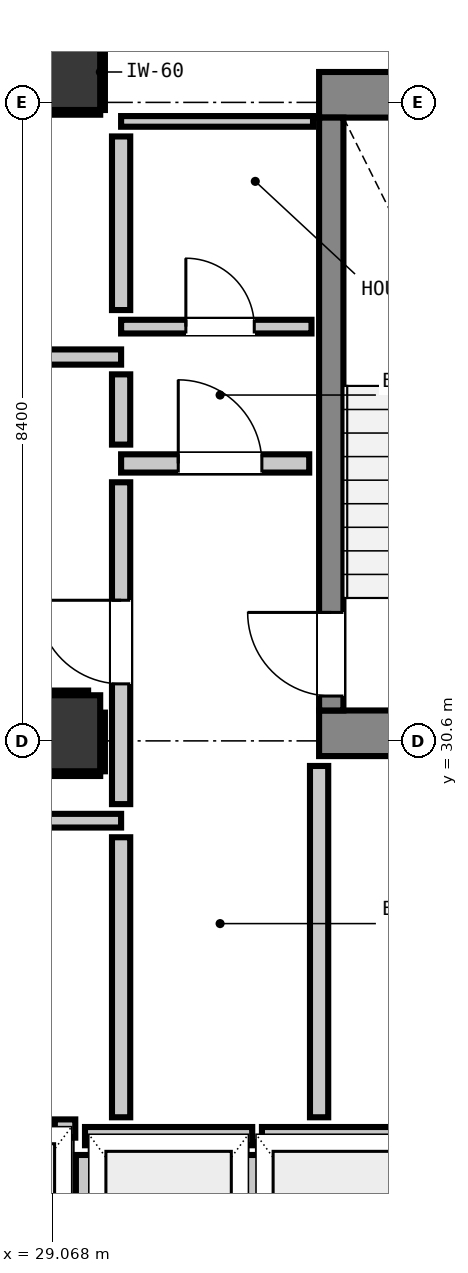
"""IFC4 building model, lengths in metres.
Left out: names, types, materials, properties, quantities, classifications, styles, units other than length and angle.
Written with IfcOpenShell. Run it as: python <this file> out.ifc"""

import sys

from ifc_helpers import new_model, si_unit, direction, frame, frame_2d, origin, origin_2d, place, context, subcontext, project, spatial, rectangle, extrude, element, fill, save


model = new_model("IFC4")
c1 = context("Model", 3, precision=1e-05, world=origin(), true_north=direction((0.0, 1.0)))
c2 = subcontext(c1, "Body", "Model", "MODEL_VIEW")
j1 = project(units=[si_unit("LENGTHUNIT", "METRE"), si_unit("PLANEANGLEUNIT", "RADIAN")], contexts=[c1])
p1 = place(None, origin())
s1 = spatial("IfcSite", under=j1, at=p1, CompositionType="ELEMENT")
p2 = place(p1, origin())
s2 = spatial("IfcBuilding", under=s1, at=p2, CompositionType="ELEMENT")
p3 = place(p2, frame((0.0, 0.0, 48.56)))
s3 = spatial("IfcBuildingStorey", under=s2, at=p3, CompositionType="ELEMENT", Elevation=48.56)
p4 = place(p3, frame((29.2, 39.4, 0.0), z_axis=(0.0, 0.0, 1.0), x_axis=(1.0, 0.0, 0.0)))
e1 = element("IfcColumn", 1, at=p4, inside=s3, PredefinedType="COLUMN", context=c2, shape_type="SweptSolid", body=[
    extrude(rectangle(XDim=1.0, YDim=1.0, at=origin_2d()), origin(), (0.0, 0.0, 1.0), 3.32),
])
p5 = place(p3, frame((32.58, 39.1, 0.0), z_axis=(0.0, 0.0, 1.0), x_axis=(1.0, 0.0, 0.0)))
e2 = element("IfcWall", 2, at=p5, inside=s3, PredefinedType="SHEAR", context=c2, shape_type="SweptSolid", body=[
    extrude(rectangle(XDim=4.08, YDim=0.6, at=frame_2d((2.04, 0.0))), origin(), (0.0, 0.0, 1.0), 3.32),
])
p6 = place(p3, frame((32.58, 30.7, 0.0), z_axis=(0.0, 0.0, 1.0), x_axis=(1.0, 0.0, 0.0)))
e3 = element("IfcWall", 3, at=p6, inside=s3, PredefinedType="SHEAR", context=c2, shape_type="SweptSolid", body=[
    extrude(rectangle(XDim=3.415, YDim=0.6, at=frame_2d((1.708, 0.0))), origin(), (0.0, 0.0, 1.0), 3.32),
])
p7 = place(p3, frame((32.74, 31.0, 0.0), z_axis=(0.0, 0.0, 1.0), x_axis=(0.0, 1.0, 0.0)))
e4 = element("IfcWall", 4, at=p7, inside=s3, PredefinedType="SHEAR", context=c2, shape_type="SweptSolid", body=[
    extrude(rectangle(XDim=7.8, YDim=0.32, at=frame_2d((3.9, 0.0))), origin(), (0.0, 0.0, 1.0), 3.32),
])
p8 = place(p7, frame((0.19, 0.0, 0.0)))
e5 = element("IfcOpeningElement", 5, at=p8, cuts=e4, PredefinedType="OPENING", context=c2, shape_type="SweptSolid", body=[
    extrude(rectangle(XDim=1.1, YDim=2.15, at=frame_2d((0.55, 1.075))), frame((0.0, 0.17, 0.0), z_axis=(0.0, -1.0, 0.0), x_axis=(1.0, 0.0, 0.0)), (0.0, 0.0, 1.0), 0.34),
])
p9 = place(p3, frame((29.2, 30.7, 0.0), z_axis=(0.0, 0.0, 1.0), x_axis=(1.0, 0.0, 0.0)))
e6 = element("IfcColumn", 6, at=p9, inside=s3, PredefinedType="COLUMN", context=c2, shape_type="SweptSolid", body=[
    extrude(rectangle(XDim=1.0, YDim=1.0, at=origin_2d()), origin(), (0.0, 0.0, 1.0), 3.32),
])
p10 = place(p3, frame((29.5, 25.4, 0.0), z_axis=(0.0, 0.0, 1.0), x_axis=(1.0, 0.0, 0.0)))
e7 = element("IfcWall", 7, at=p10, inside=s3, PredefinedType="PARTITIONING", context=c2, shape_type="SweptSolid", body=[
    extrude(rectangle(XDim=2.2, YDim=0.24, at=frame_2d((1.1, 0.0))), origin(), (0.0, 0.0, 1.0), 3.06),
])
p11 = place(p3, frame((29.5, 22.632, 0.0), z_axis=(0.0, 0.0, 1.0), x_axis=(0.0, 1.0, 0.0)))
e8 = element("IfcWall", 8, at=p11, inside=s3, PredefinedType="PARTITIONING", context=c2, shape_type="SweptSolid", body=[
    extrude(rectangle(XDim=2.52, YDim=0.24, at=frame_2d((1.26, 0.0))), origin(), (0.0, 0.0, 1.0), 2.295),
])
p12 = place(p3, frame((31.7, 22.73, 0.0), z_axis=(0.0, 0.0, 1.0), x_axis=(0.0, 1.0, 0.0)))
e9 = element("IfcWall", 9, at=p12, inside=s3, PredefinedType="PARTITIONING", context=c2, shape_type="SweptSolid", body=[
    extrude(rectangle(XDim=2.422, YDim=0.24, at=frame_2d((1.211, 0.0))), origin(), (0.0, 0.0, 1.0), 3.06),
])
p13 = place(p3, frame((31.828, 25.4, 0.0), z_axis=(0.0, 0.0, 1.0), x_axis=(1.0, 0.0, 0.0)))
e10 = element("IfcWall", 10, at=p13, inside=s3, PredefinedType="PARTITIONING", context=c2, shape_type="SweptSolid", body=[
    extrude(rectangle(XDim=2.072, YDim=0.24, at=frame_2d((1.036, 0.0))), origin(), (0.0, 0.0, 1.0), 3.06),
])
p14 = place(p3, frame((29.103, 25.5, 0.0), z_axis=(0.0, 0.0, 1.0), x_axis=(1.0, 0.0, 0.0)))
e11 = element("IfcWall", 11, at=p14, inside=s3, PredefinedType="PARTITIONING", context=c2, shape_type="SweptSolid", body=[
    extrude(rectangle(XDim=0.269, YDim=0.24, at=frame_2d((0.135, 0.0))), origin(), (0.0, 0.0, 1.0), 3.06),
])
p15 = place(p3, frame((29.975, 34.25, 0.0), z_axis=(0.0, 0.0, 1.0), x_axis=(1.0, 0.0, 0.0)))
e12 = element("IfcWall", 12, at=p15, inside=s3, PredefinedType="PARTITIONING", context=c2, shape_type="SweptSolid", body=[
    extrude(rectangle(XDim=2.475, YDim=0.24, at=frame_2d((1.237, 0.0))), origin(), (0.0, 0.0, 1.0), 3.06),
])
p16 = place(p15, frame((0.752, 0.0, 0.0)))
e13 = element("IfcOpeningElement", 13, at=p16, cuts=e12, PredefinedType="OPENING", context=c2, shape_type="SweptSolid", body=[
    extrude(rectangle(XDim=1.1, YDim=2.15, at=frame_2d((0.55, 1.075))), frame((0.0, 0.13, 0.0), z_axis=(0.0, -1.0, 0.0), x_axis=(1.0, 0.0, 0.0)), (0.0, 0.0, 1.0), 0.26),
])
p17 = place(p3, frame((28.604, 35.65, 0.0), z_axis=(0.0, 0.0, 1.0), x_axis=(1.0, 0.0, 0.0)))
e14 = element("IfcWall", 14, at=p17, inside=s3, PredefinedType="PARTITIONING", context=c2, shape_type="SweptSolid", body=[
    extrude(rectangle(XDim=1.371, YDim=0.2, at=frame_2d((0.686, 0.0))), origin(), (0.0, 0.0, 1.0), 3.06),
])
p18 = place(p3, frame((20.65, 29.55, 0.0), z_axis=(0.0, 0.0, 1.0), x_axis=(1.0, 0.0, 0.0)))
e15 = element("IfcWall", 15, at=p18, inside=s3, PredefinedType="PARTITIONING", context=c2, shape_type="SweptSolid", body=[
    extrude(rectangle(XDim=9.325, YDim=0.18, at=frame_2d((4.663, 0.0))), origin(), (0.0, 0.0, 1.0), 3.06),
])
p19 = place(p3, frame((29.975, 36.05, 0.0), z_axis=(0.0, 0.0, 1.0), x_axis=(1.0, 0.0, 0.0)))
e16 = element("IfcWall", 16, at=p19, inside=s3, PredefinedType="PARTITIONING", context=c2, shape_type="SweptSolid", body=[
    extrude(rectangle(XDim=2.505, YDim=0.18, at=frame_2d((1.252, 0.0))), origin(), (0.0, 0.0, 1.0), 3.06),
])
p20 = place(p19, frame((0.852, 0.0, 0.0)))
e17 = element("IfcOpeningElement", 17, at=p20, cuts=e16, PredefinedType="OPENING", context=c2, shape_type="SweptSolid", body=[
    extrude(rectangle(XDim=0.9, YDim=2.1, at=frame_2d((0.45, 1.05))), frame((0.0, 0.1, 0.0), z_axis=(0.0, -1.0, 0.0), x_axis=(1.0, 0.0, 0.0)), (0.0, 0.0, 1.0), 0.2),
])
p21 = place(p3, frame((29.975, 38.75, 0.0), z_axis=(0.0, 0.0, 1.0), x_axis=(1.0, 0.0, 0.0)))
e18 = element("IfcWall", 18, at=p21, inside=s3, PredefinedType="PARTITIONING", context=c2, shape_type="SweptSolid", body=[
    extrude(rectangle(XDim=2.525, YDim=0.14, at=frame_2d((1.262, 0.0))), origin(), (0.0, 0.0, 1.0), 3.06),
])
p22 = place(p3, frame((29.975, 25.648, 0.0), z_axis=(0.0, 0.0, 1.0), x_axis=(0.0, 1.0, 0.0)))
e19 = element("IfcWall", 19, at=p22, inside=s3, PredefinedType="PARTITIONING", context=c2, shape_type="SweptSolid", body=[
    extrude(rectangle(XDim=3.684, YDim=0.24, at=frame_2d((1.842, 0.0))), origin(), (0.0, 0.0, 1.0), 3.06),
])
p23 = place(p3, frame((29.975, 29.768, 0.0), z_axis=(0.0, 0.0, 1.0), x_axis=(0.0, 1.0, 0.0)))
e20 = element("IfcWall", 20, at=p23, inside=s3, PredefinedType="PARTITIONING", context=c2, shape_type="SweptSolid", body=[
    extrude(rectangle(XDim=4.234, YDim=0.24, at=frame_2d((2.117, 0.0))), origin(), (0.0, 0.0, 1.0), 3.06),
])
p24 = place(p23, frame((1.582, 0.0, 0.0)))
e21 = element("IfcOpeningElement", 21, at=p24, cuts=e20, PredefinedType="OPENING", context=c2, shape_type="SweptSolid", body=[
    extrude(rectangle(XDim=1.1, YDim=2.15, at=frame_2d((0.55, 1.075))), frame((0.0, 0.13, 0.0), z_axis=(0.0, -1.0, 0.0), x_axis=(1.0, 0.0, 0.0)), (0.0, 0.0, 1.0), 0.26),
])
p25 = place(p3, frame((29.975, 34.498, 0.0), z_axis=(0.0, 0.0, 1.0), x_axis=(0.0, 1.0, 0.0)))
e22 = element("IfcWall", 22, at=p25, inside=s3, PredefinedType="PARTITIONING", context=c2, shape_type="SweptSolid", body=[
    extrude(rectangle(XDim=0.924, YDim=0.24, at=frame_2d((0.462, 0.0))), origin(), (0.0, 0.0, 1.0), 3.06),
])
p26 = place(p3, frame((29.975, 36.268, 0.0), z_axis=(0.0, 0.0, 1.0), x_axis=(0.0, 1.0, 0.0)))
e23 = element("IfcWall", 23, at=p26, inside=s3, PredefinedType="PARTITIONING", context=c2, shape_type="SweptSolid", body=[
    extrude(rectangle(XDim=2.284, YDim=0.24, at=frame_2d((1.142, 0.0))), origin(), (0.0, 0.0, 1.0), 3.06),
])
p27 = place(p3, frame((32.58, 25.648, 0.0), z_axis=(0.0, 0.0, 1.0), x_axis=(0.0, 1.0, 0.0)))
e24 = element("IfcWall", 24, at=p27, inside=s3, PredefinedType="PARTITIONING", context=c2, shape_type="SweptSolid", body=[
    extrude(rectangle(XDim=4.622, YDim=0.24, at=frame_2d((2.311, 0.0))), origin(), (0.0, 0.0, 1.0), 3.06),
])
p28 = place(p3, frame((28.71, 38.868, 0.0), z_axis=(0.0, 0.0, 1.0), x_axis=(1.0, 0.0, 0.0)))
e25 = element("IfcWall", 25, at=p28, inside=s3, PredefinedType="PARTITIONING", context=c2, shape_type="SweptSolid", body=[
    extrude(rectangle(XDim=0.99, YDim=0.06, at=frame_2d((0.495, 0.0))), origin(), (0.0, 0.0, 1.0), 1.45),
])
for number, where, z_axis, x_axis in (
    (26, (29.732, 38.9, 0.0), (0.0, 0.0, 1.0), (0.0, 1.0, 0.0)),
    (27, (28.7, 30.168, 0.0), (0.0, 0.0, 1.0), (1.0, 0.0, 0.0)),
):
    element("IfcWall", number, at=place(p3, frame(where, z_axis=z_axis, x_axis=x_axis)), inside=s3, PredefinedType="PARTITIONING", context=c2, shape_type="SweptSolid", body=[
        extrude(rectangle(XDim=1.0, YDim=0.06, at=frame_2d((0.5, 0.0))), origin(), (0.0, 0.0, 1.0), 1.45),
    ])
p29 = place(p3, frame((28.7, 31.232, 0.0), z_axis=(0.0, 0.0, 1.0), x_axis=(1.0, 0.0, 0.0)))
e28 = element("IfcWall", 28, at=p29, inside=s3, PredefinedType="PARTITIONING", context=c2, shape_type="SweptSolid", body=[
    extrude(rectangle(XDim=0.841, YDim=0.06, at=frame_2d((0.42, 0.0))), origin(), (0.0, 0.0, 1.0), 1.45),
])
p30 = place(p3, frame((29.732, 30.2, 0.0), z_axis=(0.0, 0.0, 1.0), x_axis=(0.0, 1.0, 0.0)))
e29 = element("IfcWall", 29, at=p30, inside=s3, PredefinedType="PARTITIONING", context=c2, shape_type="SweptSolid", body=[
    extrude(rectangle(XDim=0.772, YDim=0.06, at=frame_2d((0.386, 0.0))), origin(), (0.0, 0.0, 1.0), 1.45),
])
p31 = place(p8, origin())
e30 = element("IfcDoor", 30, at=p31, inside=s3, OperationType="SINGLE_SWING_RIGHT", PredefinedType="DOOR", context=c2, shape_type="SweptSolid", body=[
    extrude(rectangle(XDim=1.1, YDim=2.15, at=frame_2d((0.55, 1.075))), frame((0.0, 0.025, 0.0), z_axis=(0.0, -1.0, 0.0), x_axis=(1.0, 0.0, 0.0)), (0.0, 0.0, 1.0), 0.05),
])
fill(e5, e30)
p32 = place(p24, origin())
e31 = element("IfcDoor", 31, at=p32, inside=s3, OperationType="SINGLE_SWING_RIGHT", PredefinedType="DOOR", context=c2, shape_type="SweptSolid", body=[
    extrude(rectangle(XDim=1.1, YDim=2.15, at=frame_2d((0.55, 1.075))), frame((0.0, 0.025, 0.0), z_axis=(0.0, -1.0, 0.0), x_axis=(1.0, 0.0, 0.0)), (0.0, 0.0, 1.0), 0.05),
])
fill(e21, e31)
p33 = place(p16, origin())
e32 = element("IfcDoor", 32, at=p33, inside=s3, OperationType="SINGLE_SWING_LEFT", PredefinedType="DOOR", context=c2, shape_type="SweptSolid", body=[
    extrude(rectangle(XDim=1.1, YDim=2.15, at=frame_2d((0.55, 1.075))), frame((0.0, 0.025, 0.0), z_axis=(0.0, -1.0, 0.0), x_axis=(1.0, 0.0, 0.0)), (0.0, 0.0, 1.0), 0.05),
])
fill(e13, e32)
p34 = place(p20, origin())
e33 = element("IfcDoor", 33, at=p34, inside=s3, OperationType="SINGLE_SWING_LEFT", PredefinedType="DOOR", context=c2, shape_type="SweptSolid", body=[
    extrude(rectangle(XDim=0.9, YDim=2.1, at=frame_2d((0.45, 1.05))), frame((0.0, 0.025, 0.0), z_axis=(0.0, -1.0, 0.0), x_axis=(1.0, 0.0, 0.0)), (0.0, 0.0, 1.0), 0.05),
])
fill(e17, e33)
save(model, sys.argv[1])
